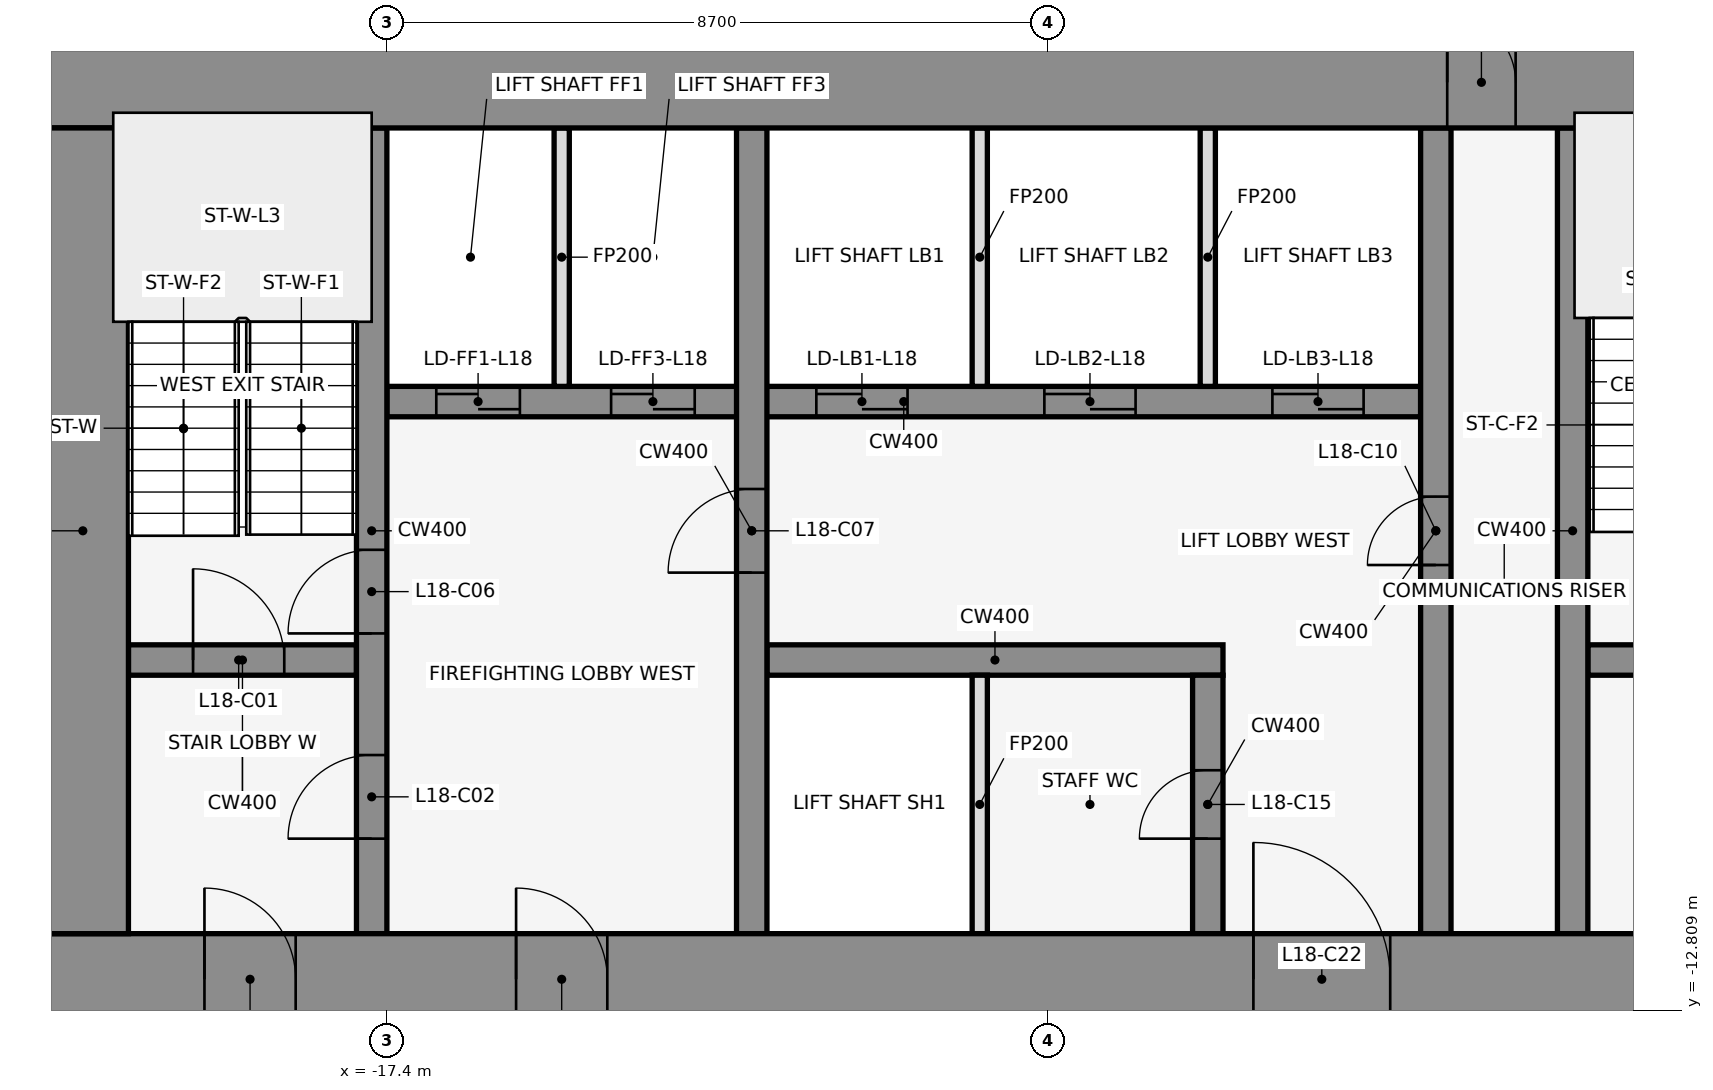
"""IFC4 building model, lengths in metres.
Left out: names, types, materials, properties, quantities, classifications, styles, units other than length and angle.
Written with IfcOpenShell. Run it as: python <this file> out.ifc"""

import sys

from ifc_helpers import new_model, si_unit, direction, frame, frame_2d, origin, place, context, subcontext, project, spatial, rectangle, extrude, element, fill, save


model = new_model("IFC4")
c1 = context("Model", 3, precision=1e-05, world=origin(), true_north=direction((0.0, 1.0)))
c2 = subcontext(c1, "Body", "Model", "MODEL_VIEW")
j1 = project(units=[si_unit("LENGTHUNIT", "METRE"), si_unit("PLANEANGLEUNIT", "RADIAN")], contexts=[c1])
p1 = place(None, origin())
s1 = spatial("IfcSite", under=j1, at=p1, CompositionType="ELEMENT")
p2 = place(p1, origin())
s2 = spatial("IfcBuilding", under=s1, at=p2, CompositionType="ELEMENT")
p3 = place(p2, frame((0.0, 0.0, 89.9)))
s3 = spatial("IfcBuildingStorey", under=s2, at=p3, CompositionType="ELEMENT", Elevation=89.9)
for number, where, z_axis, x_axis in (
    (1, (-0.068, -0.105, 0.0), (0.0, 0.0, 1.0), (-0.84, 0.543, 0.0)),
    (2, (-14.599, 1.08, 0.0), (0.0, 0.0, 1.0), (-0.84, -0.543, 0.0)),
):
    element("IfcWall", number, at=place(p3, frame(where, z_axis=z_axis, x_axis=x_axis)), inside=s3, PredefinedType="STANDARD", context=c2, shape_type="SweptSolid", body=[
        extrude(rectangle(XDim=2.183, YDim=0.25, at=frame_2d((1.091, 0.0))), origin(), (0.0, 0.0, 1.0), 3.95),
    ])
p4 = place(p3, frame((-20.8, -8.2, 0.0), z_axis=(0.0, 0.0, 1.0), x_axis=(1.0, 0.0, 0.0)))
e3 = element("IfcWall", 3, at=p4, inside=s3, PredefinedType="SHEAR", context=c2, shape_type="SweptSolid", body=[
    extrude(rectangle(XDim=3.0, YDim=0.4, at=frame_2d((1.5, 0.0))), origin(), (0.0, 0.0, 1.0), 4.1),
])
p5 = place(p4, frame((0.85, 0.0, 0.0)))
e4 = element("IfcOpeningElement", 4, at=p5, cuts=e3, PredefinedType="OPENING", context=c2, shape_type="SweptSolid", body=[
    extrude(rectangle(XDim=1.2, YDim=2.1, at=frame_2d((0.6, 1.05))), frame((0.0, 0.212, 0.0), z_axis=(0.0, -1.0, 0.0), x_axis=(1.0, 0.0, 0.0)), (0.0, 0.0, 1.0), 0.424),
])
p6 = place(p3, frame((-12.4, -8.2, 0.0), z_axis=(0.0, 0.0, 1.0), x_axis=(1.0, 0.0, 0.0)))
e5 = element("IfcWall", 5, at=p6, inside=s3, PredefinedType="SHEAR", context=c2, shape_type="SweptSolid", body=[
    extrude(rectangle(XDim=6.0, YDim=0.4, at=frame_2d((3.0, 0.0))), origin(), (0.0, 0.0, 1.0), 4.1),
])
p7 = place(p3, frame((-1.6, -8.2, 0.0), z_axis=(0.0, 0.0, 1.0), x_axis=(1.0, 0.0, 0.0)))
e6 = element("IfcWall", 6, at=p7, inside=s3, PredefinedType="SHEAR", context=c2, shape_type="SweptSolid", body=[
    extrude(rectangle(XDim=3.2, YDim=0.4, at=frame_2d((1.6, 0.0))), origin(), (0.0, 0.0, 1.0), 4.1),
])
p8 = place(p7, frame((1.05, 0.0, 0.0)))
e7 = element("IfcOpeningElement", 7, at=p8, cuts=e6, PredefinedType="OPENING", context=c2, shape_type="SweptSolid", body=[
    extrude(rectangle(XDim=1.2, YDim=2.1, at=frame_2d((0.6, 1.05))), frame((0.0, 0.212, 0.0), z_axis=(0.0, -1.0, 0.0), x_axis=(1.0, 0.0, 0.0)), (0.0, 0.0, 1.0), 0.424),
])
p9 = place(p3, frame((-17.4, -4.8, 0.0), z_axis=(0.0, 0.0, 1.0), x_axis=(1.0, 0.0, 0.0)))
e8 = element("IfcWall", 8, at=p9, inside=s3, PredefinedType="SHEAR", context=c2, shape_type="SweptSolid", body=[
    extrude(rectangle(XDim=13.6, YDim=0.4, at=frame_2d((6.8, 0.0))), origin(), (0.0, 0.0, 1.0), 4.1),
])
p10 = place(p9, frame((0.65, 0.0, 0.0)))
e9 = element("IfcOpeningElement", 9, at=p10, cuts=e8, PredefinedType="OPENING", context=c2, shape_type="SweptSolid", body=[
    extrude(rectangle(XDim=1.1, YDim=2.1, at=frame_2d((0.55, 1.05))), frame((0.0, 0.212, 0.0), z_axis=(0.0, -1.0, 0.0), x_axis=(1.0, 0.0, 0.0)), (0.0, 0.0, 1.0), 0.424),
])
p11 = place(p9, frame((2.95, 0.0, 0.0)))
e10 = element("IfcOpeningElement", 10, at=p11, cuts=e8, PredefinedType="OPENING", context=c2, shape_type="SweptSolid", body=[
    extrude(rectangle(XDim=1.1, YDim=2.1, at=frame_2d((0.55, 1.05))), frame((0.0, 0.212, 0.0), z_axis=(0.0, -1.0, 0.0), x_axis=(1.0, 0.0, 0.0)), (0.0, 0.0, 1.0), 0.424),
])
p12 = place(p9, frame((5.65, 0.0, 0.0)))
e11 = element("IfcOpeningElement", 11, at=p12, cuts=e8, PredefinedType="OPENING", context=c2, shape_type="SweptSolid", body=[
    extrude(rectangle(XDim=1.2, YDim=2.1, at=frame_2d((0.6, 1.05))), frame((0.0, 0.212, 0.0), z_axis=(0.0, -1.0, 0.0), x_axis=(1.0, 0.0, 0.0)), (0.0, 0.0, 1.0), 0.424),
])
p13 = place(p9, frame((8.65, 0.0, 0.0)))
e12 = element("IfcOpeningElement", 12, at=p13, cuts=e8, PredefinedType="OPENING", context=c2, shape_type="SweptSolid", body=[
    extrude(rectangle(XDim=1.2, YDim=2.1, at=frame_2d((0.6, 1.05))), frame((0.0, 0.212, 0.0), z_axis=(0.0, -1.0, 0.0), x_axis=(1.0, 0.0, 0.0)), (0.0, 0.0, 1.0), 0.424),
])
p14 = place(p9, frame((11.65, 0.0, 0.0)))
e13 = element("IfcOpeningElement", 13, at=p14, cuts=e8, PredefinedType="OPENING", context=c2, shape_type="SweptSolid", body=[
    extrude(rectangle(XDim=1.2, YDim=2.1, at=frame_2d((0.6, 1.05))), frame((0.0, 0.212, 0.0), z_axis=(0.0, -1.0, 0.0), x_axis=(1.0, 0.0, 0.0)), (0.0, 0.0, 1.0), 0.424),
])
p15 = place(p3, frame((-17.6, -11.8, 0.0), z_axis=(0.0, 0.0, 1.0), x_axis=(0.0, 1.0, 0.0)))
e14 = element("IfcWall", 14, at=p15, inside=s3, PredefinedType="SHEAR", context=c2, shape_type="SweptSolid", body=[
    extrude(rectangle(XDim=10.6, YDim=0.4, at=frame_2d((5.3, 0.0))), origin(), (0.0, 0.0, 1.0), 4.1),
])
p16 = place(p15, frame((1.25, 0.0, 0.0)))
e15 = element("IfcOpeningElement", 15, at=p16, cuts=e14, PredefinedType="OPENING", context=c2, shape_type="SweptSolid", body=[
    extrude(rectangle(XDim=1.1, YDim=2.1, at=frame_2d((0.55, 1.05))), frame((0.0, 0.212, 0.0), z_axis=(0.0, -1.0, 0.0), x_axis=(1.0, 0.0, 0.0)), (0.0, 0.0, 1.0), 0.424),
])
p17 = place(p15, frame((3.95, 0.0, 0.0)))
e16 = element("IfcOpeningElement", 16, at=p17, cuts=e14, PredefinedType="OPENING", context=c2, shape_type="SweptSolid", body=[
    extrude(rectangle(XDim=1.1, YDim=2.1, at=frame_2d((0.55, 1.05))), frame((0.0, 0.212, 0.0), z_axis=(0.0, -1.0, 0.0), x_axis=(1.0, 0.0, 0.0)), (0.0, 0.0, 1.0), 0.424),
])
p18 = place(p3, frame((-15.1, -4.6, 0.0), z_axis=(0.0, 0.0, 1.0), x_axis=(0.0, 1.0, 0.0)))
e17 = element("IfcWall", 17, at=p18, inside=s3, PredefinedType="PARTITIONING", context=c2, shape_type="SweptSolid", body=[
    extrude(rectangle(XDim=3.4, YDim=0.2, at=frame_2d((1.7, 0.0))), origin(), (0.0, 0.0, 1.0), 3.018),
])
p19 = place(p3, frame((-12.6, -11.8, 0.0), z_axis=(0.0, 0.0, 1.0), x_axis=(0.0, 1.0, 0.0)))
e18 = element("IfcWall", 18, at=p19, inside=s3, PredefinedType="SHEAR", context=c2, shape_type="SweptSolid", body=[
    extrude(rectangle(XDim=10.6, YDim=0.4, at=frame_2d((5.3, 0.0))), origin(), (0.0, 0.0, 1.0), 4.1),
])
p20 = place(p19, frame((4.75, 0.0, 0.0)))
e19 = element("IfcOpeningElement", 19, at=p20, cuts=e18, PredefinedType="OPENING", context=c2, shape_type="SweptSolid", body=[
    extrude(rectangle(XDim=1.1, YDim=2.1, at=frame_2d((0.55, 1.05))), frame((0.0, 0.212, 0.0), z_axis=(0.0, -1.0, 0.0), x_axis=(1.0, 0.0, 0.0)), (0.0, 0.0, 1.0), 0.424),
])
for number, where, z_axis, x_axis in (
    (20, (-9.6, -11.8, 0.0), (0.0, 0.0, 1.0), (0.0, 1.0, 0.0)),
    (21, (-9.6, -4.6, 0.0), (0.0, 0.0, 1.0), (0.0, 1.0, 0.0)),
):
    element("IfcWall", number, at=place(p3, frame(where, z_axis=z_axis, x_axis=x_axis)), inside=s3, PredefinedType="PARTITIONING", context=c2, shape_type="SweptSolid", body=[
        extrude(rectangle(XDim=3.4, YDim=0.2, at=frame_2d((1.7, 0.0))), origin(), (0.0, 0.0, 1.0), 3.018),
    ])
p21 = place(p3, frame((-6.6, -11.8, 0.0), z_axis=(0.0, 0.0, 1.0), x_axis=(0.0, 1.0, 0.0)))
e22 = element("IfcWall", 22, at=p21, inside=s3, PredefinedType="SHEAR", context=c2, shape_type="SweptSolid", body=[
    extrude(rectangle(XDim=3.4, YDim=0.4, at=frame_2d((1.7, 0.0))), origin(), (0.0, 0.0, 1.0), 4.1),
])
p22 = place(p21, frame((1.25, 0.0, 0.0)))
e23 = element("IfcOpeningElement", 23, at=p22, cuts=e22, PredefinedType="OPENING", context=c2, shape_type="SweptSolid", body=[
    extrude(rectangle(XDim=0.9, YDim=2.1, at=frame_2d((0.45, 1.05))), frame((0.0, 0.212, 0.0), z_axis=(0.0, -1.0, 0.0), x_axis=(1.0, 0.0, 0.0)), (0.0, 0.0, 1.0), 0.424),
])
p23 = place(p3, frame((-6.6, -4.6, 0.0), z_axis=(0.0, 0.0, 1.0), x_axis=(0.0, 1.0, 0.0)))
e24 = element("IfcWall", 24, at=p23, inside=s3, PredefinedType="PARTITIONING", context=c2, shape_type="SweptSolid", body=[
    extrude(rectangle(XDim=3.4, YDim=0.2, at=frame_2d((1.7, 0.0))), origin(), (0.0, 0.0, 1.0), 3.018),
])
p24 = place(p3, frame((-3.6, -11.8, 0.0), z_axis=(0.0, 0.0, 1.0), x_axis=(0.0, 1.0, 0.0)))
e25 = element("IfcWall", 25, at=p24, inside=s3, PredefinedType="SHEAR", context=c2, shape_type="SweptSolid", body=[
    extrude(rectangle(XDim=10.6, YDim=0.4, at=frame_2d((5.3, 0.0))), origin(), (0.0, 0.0, 1.0), 4.1),
])
p25 = place(p24, frame((4.85, 0.0, 0.0)))
e26 = element("IfcOpeningElement", 26, at=p25, cuts=e25, PredefinedType="OPENING", context=c2, shape_type="SweptSolid", body=[
    extrude(rectangle(XDim=0.9, YDim=2.1, at=frame_2d((0.45, 1.05))), frame((0.0, 0.212, 0.0), z_axis=(0.0, -1.0, 0.0), x_axis=(1.0, 0.0, 0.0)), (0.0, 0.0, 1.0), 0.424),
])
p26 = place(p3, frame((-1.8, -11.8, 0.0), z_axis=(0.0, 0.0, 1.0), x_axis=(0.0, 1.0, 0.0)))
e27 = element("IfcWall", 27, at=p26, inside=s3, PredefinedType="SHEAR", context=c2, shape_type="SweptSolid", body=[
    extrude(rectangle(XDim=10.6, YDim=0.4, at=frame_2d((5.3, 0.0))), origin(), (0.0, 0.0, 1.0), 4.1),
])
p27 = place(p3, frame((-22.0, -0.6, 0.0), z_axis=(0.0, 0.0, 1.0), x_axis=(1.0, 0.0, 0.0)))
e28 = element("IfcWall", 28, at=p27, inside=s3, PredefinedType="SHEAR", context=c2, shape_type="SweptSolid", body=[
    extrude(rectangle(XDim=44.0, YDim=1.2, at=frame_2d((22.0, 0.0))), origin(), (0.0, 0.0, 1.0), 4.1),
])
p28 = place(p27, frame((18.55, 0.0, 0.0)))
e29 = element("IfcOpeningElement", 29, at=p28, cuts=e28, PredefinedType="OPENING", context=c2, shape_type="SweptSolid", body=[
    extrude(rectangle(XDim=0.9, YDim=2.1, at=frame_2d((0.45, 1.05))), frame((0.0, 0.612, 0.0), z_axis=(0.0, -1.0, 0.0), x_axis=(1.0, 0.0, 0.0)), (0.0, 0.0, 1.0), 1.224),
])
p29 = place(p27, frame((24.55, 0.0, 0.0)))
e30 = element("IfcOpeningElement", 30, at=p29, cuts=e28, PredefinedType="OPENING", context=c2, shape_type="SweptSolid", body=[
    extrude(rectangle(XDim=0.9, YDim=2.1, at=frame_2d((0.45, 1.05))), frame((0.0, 0.612, 0.0), z_axis=(0.0, -1.0, 0.0), x_axis=(1.0, 0.0, 0.0)), (0.0, 0.0, 1.0), 1.224),
])
p30 = place(p3, frame((-22.0, -12.4, 0.0), z_axis=(0.0, 0.0, 1.0), x_axis=(1.0, 0.0, 0.0)))
e31 = element("IfcWall", 31, at=p30, inside=s3, PredefinedType="SHEAR", context=c2, shape_type="SweptSolid", body=[
    extrude(rectangle(XDim=44.0, YDim=1.2, at=frame_2d((22.0, 0.0))), origin(), (0.0, 0.0, 1.0), 4.1),
])
p31 = place(p30, frame((2.2, 0.0, 0.0)))
e32 = element("IfcOpeningElement", 32, at=p31, cuts=e31, PredefinedType="OPENING", context=c2, shape_type="SweptSolid", body=[
    extrude(rectangle(XDim=1.2, YDim=2.1, at=frame_2d((0.6, 1.05))), frame((0.0, 0.612, 0.0), z_axis=(0.0, -1.0, 0.0), x_axis=(1.0, 0.0, 0.0)), (0.0, 0.0, 1.0), 1.224),
])
p32 = place(p30, frame((21.4, 0.0, 0.0)))
e33 = element("IfcOpeningElement", 33, at=p32, cuts=e31, PredefinedType="OPENING", context=c2, shape_type="SweptSolid", body=[
    extrude(rectangle(XDim=1.2, YDim=2.1, at=frame_2d((0.6, 1.05))), frame((0.0, 0.612, 0.0), z_axis=(0.0, -1.0, 0.0), x_axis=(1.0, 0.0, 0.0)), (0.0, 0.0, 1.0), 1.224),
])
p33 = place(p30, frame((40.6, 0.0, 0.0)))
e34 = element("IfcOpeningElement", 34, at=p33, cuts=e31, PredefinedType="OPENING", context=c2, shape_type="SweptSolid", body=[
    extrude(rectangle(XDim=1.2, YDim=2.1, at=frame_2d((0.6, 1.05))), frame((0.0, 0.612, 0.0), z_axis=(0.0, -1.0, 0.0), x_axis=(1.0, 0.0, 0.0)), (0.0, 0.0, 1.0), 1.224),
])
p34 = place(p30, frame((16.0, 0.0, 0.0)))
e35 = element("IfcOpeningElement", 35, at=p34, cuts=e31, PredefinedType="OPENING", context=c2, shape_type="SweptSolid", body=[
    extrude(rectangle(XDim=1.8, YDim=2.1, at=frame_2d((0.9, 1.05))), frame((0.0, 0.612, 0.0), z_axis=(0.0, -1.0, 0.0), x_axis=(1.0, 0.0, 0.0)), (0.0, 0.0, 1.0), 1.224),
])
p35 = place(p30, frame((6.3, 0.0, 0.0)))
e36 = element("IfcOpeningElement", 36, at=p35, cuts=e31, PredefinedType="OPENING", context=c2, shape_type="SweptSolid", body=[
    extrude(rectangle(XDim=1.2, YDim=2.1, at=frame_2d((0.6, 1.05))), frame((0.0, 0.612, 0.0), z_axis=(0.0, -1.0, 0.0), x_axis=(1.0, 0.0, 0.0)), (0.0, 0.0, 1.0), 1.224),
])
p36 = place(p30, frame((26.2, 0.0, 0.0)))
e37 = element("IfcOpeningElement", 37, at=p36, cuts=e31, PredefinedType="OPENING", context=c2, shape_type="SweptSolid", body=[
    extrude(rectangle(XDim=1.8, YDim=2.1, at=frame_2d((0.9, 1.05))), frame((0.0, 0.612, 0.0), z_axis=(0.0, -1.0, 0.0), x_axis=(1.0, 0.0, 0.0)), (0.0, 0.0, 1.0), 1.224),
])
p37 = place(p30, frame((36.5, 0.0, 0.0)))
e38 = element("IfcOpeningElement", 38, at=p37, cuts=e31, PredefinedType="OPENING", context=c2, shape_type="SweptSolid", body=[
    extrude(rectangle(XDim=1.2, YDim=2.1, at=frame_2d((0.6, 1.05))), frame((0.0, 0.612, 0.0), z_axis=(0.0, -1.0, 0.0), x_axis=(1.0, 0.0, 0.0)), (0.0, 0.0, 1.0), 1.224),
])
p38 = place(p3, frame((-21.4, -11.8, 0.0), z_axis=(0.0, 0.0, 1.0), x_axis=(0.0, 1.0, 0.0)))
e39 = element("IfcWall", 39, at=p38, inside=s3, PredefinedType="SHEAR", context=c2, shape_type="SweptSolid", body=[
    extrude(rectangle(XDim=10.6, YDim=1.2, at=frame_2d((5.3, 0.0))), origin(), (0.0, 0.0, 1.0), 4.1),
])
p39 = place(p5, origin())
e40 = element("IfcDoor", 40, at=p39, inside=s3, OperationType="SINGLE_SWING_LEFT", PredefinedType="DOOR", context=c2, shape_type="SweptSolid", body=[
    extrude(rectangle(XDim=1.2, YDim=2.1, at=frame_2d((0.6, 1.05))), frame((0.0, 0.025, 0.0), z_axis=(0.0, -1.0, 0.0), x_axis=(1.0, 0.0, 0.0)), (0.0, 0.0, 1.0), 0.05),
])
fill(e4, e40)
p40 = place(p16, frame((1.1, 0.0, 0.0), z_axis=(0.0, 0.0, 1.0), x_axis=(-1.0, 0.0, 0.0)))
e41 = element("IfcDoor", 41, at=p40, inside=s3, OperationType="SINGLE_SWING_LEFT", PredefinedType="DOOR", context=c2, shape_type="SweptSolid", body=[
    extrude(rectangle(XDim=1.1, YDim=2.1, at=frame_2d((0.55, 1.05))), frame((0.0, 0.025, 0.0), z_axis=(0.0, -1.0, 0.0), x_axis=(1.0, 0.0, 0.0)), (0.0, 0.0, 1.0), 0.05),
])
fill(e15, e41)
p41 = place(p10, origin())
e42 = element("IfcDoor", 42, at=p41, inside=s3, OperationType="DOUBLE_DOOR_SLIDING", PredefinedType="DOOR", context=c2, shape_type="SweptSolid", body=[
    extrude(rectangle(XDim=1.1, YDim=2.1, at=frame_2d((0.55, 1.05))), frame((0.0, 0.025, 0.0), z_axis=(0.0, -1.0, 0.0), x_axis=(1.0, 0.0, 0.0)), (0.0, 0.0, 1.0), 0.05),
])
fill(e9, e42)
p42 = place(p11, origin())
e43 = element("IfcDoor", 43, at=p42, inside=s3, OperationType="DOUBLE_DOOR_SLIDING", PredefinedType="DOOR", context=c2, shape_type="SweptSolid", body=[
    extrude(rectangle(XDim=1.1, YDim=2.1, at=frame_2d((0.55, 1.05))), frame((0.0, 0.025, 0.0), z_axis=(0.0, -1.0, 0.0), x_axis=(1.0, 0.0, 0.0)), (0.0, 0.0, 1.0), 0.05),
])
fill(e10, e43)
p43 = place(p12, origin())
e44 = element("IfcDoor", 44, at=p43, inside=s3, OperationType="DOUBLE_DOOR_SLIDING", PredefinedType="DOOR", context=c2, shape_type="SweptSolid", body=[
    extrude(rectangle(XDim=1.2, YDim=2.1, at=frame_2d((0.6, 1.05))), frame((0.0, 0.025, 0.0), z_axis=(0.0, -1.0, 0.0), x_axis=(1.0, 0.0, 0.0)), (0.0, 0.0, 1.0), 0.05),
])
fill(e11, e44)
p44 = place(p13, origin())
e45 = element("IfcDoor", 45, at=p44, inside=s3, OperationType="DOUBLE_DOOR_SLIDING", PredefinedType="DOOR", context=c2, shape_type="SweptSolid", body=[
    extrude(rectangle(XDim=1.2, YDim=2.1, at=frame_2d((0.6, 1.05))), frame((0.0, 0.025, 0.0), z_axis=(0.0, -1.0, 0.0), x_axis=(1.0, 0.0, 0.0)), (0.0, 0.0, 1.0), 0.05),
])
fill(e12, e45)
p45 = place(p14, origin())
e46 = element("IfcDoor", 46, at=p45, inside=s3, OperationType="DOUBLE_DOOR_SLIDING", PredefinedType="DOOR", context=c2, shape_type="SweptSolid", body=[
    extrude(rectangle(XDim=1.2, YDim=2.1, at=frame_2d((0.6, 1.05))), frame((0.0, 0.025, 0.0), z_axis=(0.0, -1.0, 0.0), x_axis=(1.0, 0.0, 0.0)), (0.0, 0.0, 1.0), 0.05),
])
fill(e13, e46)
p46 = place(p17, frame((1.1, 0.0, 0.0), z_axis=(0.0, 0.0, 1.0), x_axis=(-1.0, 0.0, 0.0)))
e47 = element("IfcDoor", 47, at=p46, inside=s3, OperationType="SINGLE_SWING_LEFT", PredefinedType="DOOR", context=c2, shape_type="SweptSolid", body=[
    extrude(rectangle(XDim=1.1, YDim=2.1, at=frame_2d((0.55, 1.05))), frame((0.0, 0.025, 0.0), z_axis=(0.0, -1.0, 0.0), x_axis=(1.0, 0.0, 0.0)), (0.0, 0.0, 1.0), 0.05),
])
fill(e16, e47)
p47 = place(p20, origin())
e48 = element("IfcDoor", 48, at=p47, inside=s3, OperationType="SINGLE_SWING_LEFT", PredefinedType="DOOR", context=c2, shape_type="SweptSolid", body=[
    extrude(rectangle(XDim=1.1, YDim=2.1, at=frame_2d((0.55, 1.05))), frame((0.0, 0.025, 0.0), z_axis=(0.0, -1.0, 0.0), x_axis=(1.0, 0.0, 0.0)), (0.0, 0.0, 1.0), 0.05),
])
fill(e19, e48)
p48 = place(p25, frame((0.9, 0.0, 0.0), z_axis=(0.0, 0.0, 1.0), x_axis=(-1.0, 0.0, 0.0)))
e49 = element("IfcDoor", 49, at=p48, inside=s3, OperationType="SINGLE_SWING_LEFT", PredefinedType="DOOR", context=c2, shape_type="SweptSolid", body=[
    extrude(rectangle(XDim=0.9, YDim=2.1, at=frame_2d((0.45, 1.05))), frame((0.0, 0.025, 0.0), z_axis=(0.0, -1.0, 0.0), x_axis=(1.0, 0.0, 0.0)), (0.0, 0.0, 1.0), 0.05),
])
fill(e26, e49)
p49 = place(p22, origin())
e50 = element("IfcDoor", 50, at=p49, inside=s3, OperationType="SINGLE_SWING_LEFT", PredefinedType="DOOR", context=c2, shape_type="SweptSolid", body=[
    extrude(rectangle(XDim=0.9, YDim=2.1, at=frame_2d((0.45, 1.05))), frame((0.0, 0.025, 0.0), z_axis=(0.0, -1.0, 0.0), x_axis=(1.0, 0.0, 0.0)), (0.0, 0.0, 1.0), 0.05),
])
fill(e23, e50)
p50 = place(p28, origin())
e51 = element("IfcDoor", 51, at=p50, inside=s3, OperationType="SINGLE_SWING_LEFT", PredefinedType="DOOR", context=c2, shape_type="SweptSolid", body=[
    extrude(rectangle(XDim=0.9, YDim=2.1, at=frame_2d((0.45, 1.05))), frame((0.0, 0.025, 0.0), z_axis=(0.0, -1.0, 0.0), x_axis=(1.0, 0.0, 0.0)), (0.0, 0.0, 1.0), 0.05),
])
fill(e29, e51)
p51 = place(p31, frame((1.2, 0.0, 0.0), z_axis=(0.0, 0.0, 1.0), x_axis=(-1.0, 0.0, 0.0)))
e52 = element("IfcDoor", 52, at=p51, inside=s3, OperationType="SINGLE_SWING_RIGHT", PredefinedType="DOOR", context=c2, shape_type="SweptSolid", body=[
    extrude(rectangle(XDim=1.2, YDim=2.1, at=frame_2d((0.6, 1.05))), frame((0.0, 0.025, 0.0), z_axis=(0.0, -1.0, 0.0), x_axis=(1.0, 0.0, 0.0)), (0.0, 0.0, 1.0), 0.05),
])
fill(e32, e52)
p52 = place(p34, origin())
e53 = element("IfcDoor", 53, at=p52, inside=s3, OperationType="SINGLE_SWING_LEFT", PredefinedType="DOOR", context=c2, shape_type="SweptSolid", body=[
    extrude(rectangle(XDim=1.8, YDim=2.1, at=frame_2d((0.9, 1.05))), frame((0.0, 0.025, 0.0), z_axis=(0.0, -1.0, 0.0), x_axis=(1.0, 0.0, 0.0)), (0.0, 0.0, 1.0), 0.05),
])
fill(e35, e53)
p53 = place(p35, frame((1.2, 0.0, 0.0), z_axis=(0.0, 0.0, 1.0), x_axis=(-1.0, 0.0, 0.0)))
e54 = element("IfcDoor", 54, at=p53, inside=s3, OperationType="SINGLE_SWING_RIGHT", PredefinedType="DOOR", context=c2, shape_type="SweptSolid", body=[
    extrude(rectangle(XDim=1.2, YDim=2.1, at=frame_2d((0.6, 1.05))), frame((0.0, 0.025, 0.0), z_axis=(0.0, -1.0, 0.0), x_axis=(1.0, 0.0, 0.0)), (0.0, 0.0, 1.0), 0.05),
])
fill(e36, e54)
save(model, sys.argv[1])
